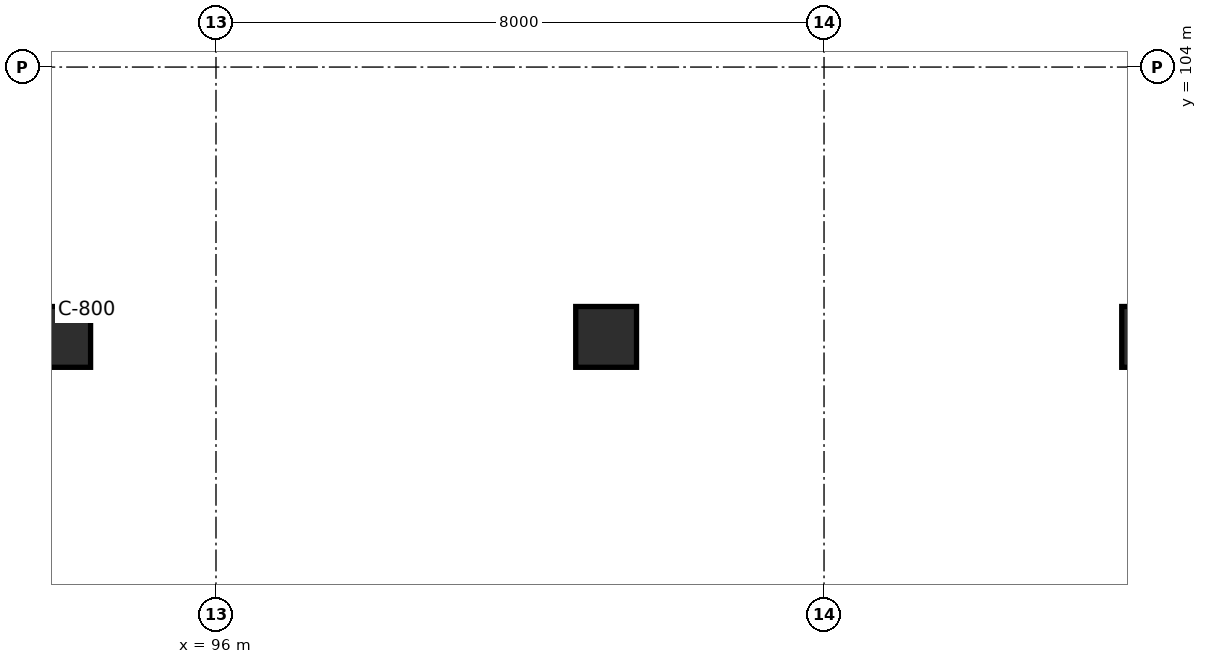
"""IFC4 building model, lengths in metres.
Left out: names, types, materials, properties, quantities, classifications, styles, units other than length and angle.
Written with IfcOpenShell. Run it as: python <this file> out.ifc"""

import sys

from ifc_helpers import new_model, si_unit, direction, frame, origin, origin_2d, place, context, subcontext, project, spatial, rectangle, extrude, element, save


model = new_model("IFC4")
c1 = context("Model", 3, precision=1e-05, world=origin(), true_north=direction((0.0, 1.0)))
c2 = subcontext(c1, "Body", "Model", "MODEL_VIEW")
j1 = project(units=[si_unit("LENGTHUNIT", "METRE"), si_unit("PLANEANGLEUNIT", "RADIAN")], contexts=[c1])
p1 = place(None, origin())
s1 = spatial("IfcSite", under=j1, at=p1, CompositionType="ELEMENT")
p2 = place(p1, origin())
s2 = spatial("IfcBuilding", under=s1, at=p2, CompositionType="ELEMENT")
p3 = place(p2, frame((0.0, 0.0, -3.84)))
s3 = spatial("IfcBuildingStorey", under=s2, at=p3, CompositionType="ELEMENT", Elevation=-3.84)
for number, where, z_axis, x_axis in (
    (1, (93.95, 100.45, 0.0), (0.0, 0.0, 1.0), (1.0, 0.0, 0.0)),
    (2, (101.133, 100.45, 0.0), (0.0, 0.0, 1.0), (1.0, 0.0, 0.0)),
    (3, (108.317, 100.45, 0.0), (0.0, 0.0, 1.0), (1.0, 0.0, 0.0)),
):
    element("IfcColumn", number, at=place(p3, frame(where, z_axis=z_axis, x_axis=x_axis)), inside=s3, PredefinedType="COLUMN", context=c2, shape_type="SweptSolid", body=[
        extrude(rectangle(XDim=0.8, YDim=0.8, at=origin_2d()), origin(), (0.0, 0.0, 1.0), 3.84),
    ])
save(model, sys.argv[1])
